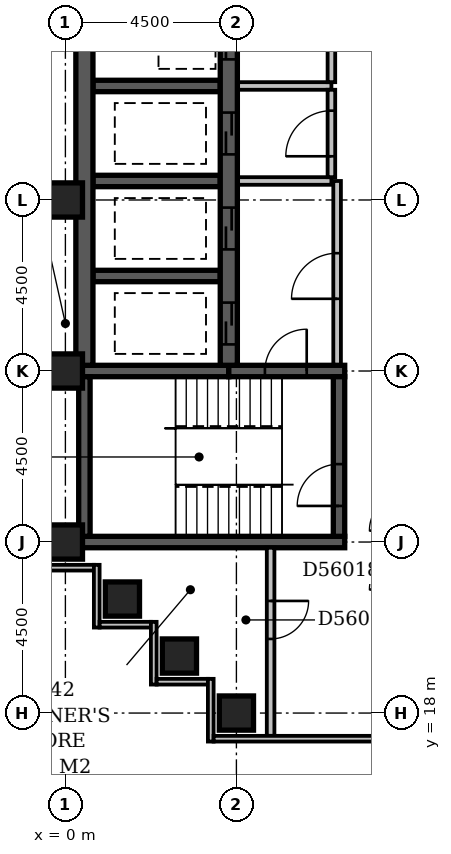
"""IFC4 building model, lengths in metres.
Left out: names, types, materials, properties, quantities, classifications, styles, units other than length and angle.
Written with IfcOpenShell. Run it as: python <this file> out.ifc"""

import sys

from ifc_helpers import new_model, si_unit, direction, frame, frame_2d, origin, origin_2d, place, context, subcontext, project, spatial, rectangle, extrude, element, fill, save


model = new_model("IFC4")
c1 = context("Model", 3, precision=1e-05, world=origin(), true_north=direction((0.0, 1.0)))
c2 = subcontext(c1, "Body", "Model", "MODEL_VIEW")
j1 = project(units=[si_unit("LENGTHUNIT", "METRE"), si_unit("PLANEANGLEUNIT", "RADIAN")], contexts=[c1])
p1 = place(None, origin())
s1 = spatial("IfcSite", under=j1, at=p1, CompositionType="ELEMENT")
p2 = place(p1, origin())
s2 = spatial("IfcBuilding", under=s1, at=p2, CompositionType="ELEMENT")
p3 = place(p2, frame((0.0, 0.0, 218.6)))
s3 = spatial("IfcBuildingStorey", under=s2, at=p3, CompositionType="ELEMENT", Elevation=218.6)
p4 = place(p3, frame((0.35, 22.5, -0.3), z_axis=(0.0, 0.0, 1.0), x_axis=(1.0, 0.0, 0.0)))
e1 = element("IfcWall", 1, at=p4, inside=s3, PredefinedType="SHEAR", context=c2, shape_type="SweptSolid", body=[
    extrude(rectangle(XDim=7.0, YDim=0.3, at=frame_2d((3.5, 0.0))), origin(), (0.0, 0.0, 1.0), 3.6),
])
p5 = place(p3, frame((0.35, 27.0, -0.3), z_axis=(0.0, 0.0, 1.0), x_axis=(1.0, 0.0, 0.0)))
e2 = element("IfcWall", 2, at=p5, inside=s3, PredefinedType="SHEAR", context=c2, shape_type="SweptSolid", body=[
    extrude(rectangle(XDim=3.95, YDim=0.3, at=frame_2d((1.975, 0.0))), origin(), (0.0, 0.0, 1.0), 3.6),
])
p6 = place(p3, frame((0.5, 22.65, -0.3), z_axis=(0.0, 0.0, 1.0), x_axis=(0.0, 1.0, 0.0)))
e3 = element("IfcWall", 3, at=p6, inside=s3, PredefinedType="SHEAR", context=c2, shape_type="SweptSolid", body=[
    extrude(rectangle(XDim=4.2, YDim=0.3, at=frame_2d((2.1, 0.0))), origin(), (0.0, 0.0, 1.0), 3.6),
])
p7 = place(p3, frame((0.5, 27.15, -0.3), z_axis=(0.0, 0.0, 1.0), x_axis=(0.0, 1.0, 0.0)))
e4 = element("IfcWall", 4, at=p7, inside=s3, PredefinedType="SHEAR", context=c2, shape_type="SweptSolid", body=[
    extrude(rectangle(XDim=22.125, YDim=0.45, at=frame_2d((11.062, 0.0))), origin(), (0.0, 0.0, 1.0), 3.6),
])
for number, where, z_axis, x_axis in (
    (5, (0.725, 29.5, -0.3), (0.0, 0.0, 1.0), (1.0, 0.0, 0.0)),
    (6, (0.725, 32.0, -0.3), (0.0, 0.0, 1.0), (1.0, 0.0, 0.0)),
    (7, (0.725, 34.5, -0.3), (0.0, 0.0, 1.0), (1.0, 0.0, 0.0)),
):
    element("IfcWall", number, at=place(p3, frame(where, z_axis=z_axis, x_axis=x_axis)), inside=s3, PredefinedType="SHEAR", context=c2, shape_type="SweptSolid", body=[
        extrude(rectangle(XDim=3.35, YDim=0.3, at=frame_2d((1.675, 0.0))), origin(), (0.0, 0.0, 1.0), 3.6),
    ])
p8 = place(p3, frame((4.3, 27.0, -0.3), z_axis=(0.0, 0.0, 1.0), x_axis=(1.0, 0.0, 0.0)))
e8 = element("IfcWall", 8, at=p8, inside=s3, PredefinedType="SHEAR", context=c2, shape_type="SweptSolid", body=[
    extrude(rectangle(XDim=3.05, YDim=0.3, at=frame_2d((1.525, 0.0))), origin(), (0.0, 0.0, 1.0), 3.6),
])
p9 = place(p8, frame((0.95, 0.0, 0.3)))
e9 = element("IfcOpeningElement", 9, at=p9, cuts=e8, PredefinedType="OPENING", context=c2, shape_type="SweptSolid", body=[
    extrude(rectangle(XDim=1.1, YDim=2.1, at=frame_2d((0.55, 1.05))), frame((0.0, 0.162, 0.0), z_axis=(0.0, -1.0, 0.0), x_axis=(1.0, 0.0, 0.0)), (0.0, 0.0, 1.0), 0.324),
])
p10 = place(p3, frame((4.3, 27.15, -0.3), z_axis=(0.0, 0.0, 1.0), x_axis=(0.0, 1.0, 0.0)))
e10 = element("IfcWall", 10, at=p10, inside=s3, PredefinedType="SHEAR", context=c2, shape_type="SweptSolid", body=[
    extrude(rectangle(XDim=22.125, YDim=0.45, at=frame_2d((11.062, 0.0))), origin(), (0.0, 0.0, 1.0), 3.6),
])
p11 = place(p10, frame((3.05, 0.0, 0.3)))
e11 = element("IfcOpeningElement", 11, at=p11, cuts=e10, PredefinedType="OPENING", context=c2, shape_type="SweptSolid", body=[
    extrude(rectangle(XDim=1.1, YDim=2.1, at=frame_2d((0.55, 1.05))), frame((0.0, 0.237, 0.0), z_axis=(0.0, -1.0, 0.0), x_axis=(1.0, 0.0, 0.0)), (0.0, 0.0, 1.0), 0.474),
])
p12 = place(p10, frame((0.55, 0.0, 0.3)))
e12 = element("IfcOpeningElement", 12, at=p12, cuts=e10, PredefinedType="OPENING", context=c2, shape_type="SweptSolid", body=[
    extrude(rectangle(XDim=1.1, YDim=2.1, at=frame_2d((0.55, 1.05))), frame((0.0, 0.237, 0.0), z_axis=(0.0, -1.0, 0.0), x_axis=(1.0, 0.0, 0.0)), (0.0, 0.0, 1.0), 0.474),
])
p13 = place(p10, frame((20.55, 0.0, 0.3)))
e13 = element("IfcOpeningElement", 13, at=p13, cuts=e10, PredefinedType="OPENING", context=c2, shape_type="SweptSolid", body=[
    extrude(rectangle(XDim=1.1, YDim=2.1, at=frame_2d((0.55, 1.05))), frame((0.0, 0.237, 0.0), z_axis=(0.0, -1.0, 0.0), x_axis=(1.0, 0.0, 0.0)), (0.0, 0.0, 1.0), 0.474),
])
p14 = place(p10, frame((18.05, 0.0, 0.3)))
e14 = element("IfcOpeningElement", 14, at=p14, cuts=e10, PredefinedType="OPENING", context=c2, shape_type="SweptSolid", body=[
    extrude(rectangle(XDim=1.1, YDim=2.1, at=frame_2d((0.55, 1.05))), frame((0.0, 0.237, 0.0), z_axis=(0.0, -1.0, 0.0), x_axis=(1.0, 0.0, 0.0)), (0.0, 0.0, 1.0), 0.474),
])
p15 = place(p10, frame((15.55, 0.0, 0.3)))
e15 = element("IfcOpeningElement", 15, at=p15, cuts=e10, PredefinedType="OPENING", context=c2, shape_type="SweptSolid", body=[
    extrude(rectangle(XDim=1.1, YDim=2.1, at=frame_2d((0.55, 1.05))), frame((0.0, 0.237, 0.0), z_axis=(0.0, -1.0, 0.0), x_axis=(1.0, 0.0, 0.0)), (0.0, 0.0, 1.0), 0.474),
])
p16 = place(p10, frame((13.05, 0.0, 0.3)))
e16 = element("IfcOpeningElement", 16, at=p16, cuts=e10, PredefinedType="OPENING", context=c2, shape_type="SweptSolid", body=[
    extrude(rectangle(XDim=1.1, YDim=2.1, at=frame_2d((0.55, 1.05))), frame((0.0, 0.237, 0.0), z_axis=(0.0, -1.0, 0.0), x_axis=(1.0, 0.0, 0.0)), (0.0, 0.0, 1.0), 0.474),
])
p17 = place(p10, frame((10.55, 0.0, 0.3)))
e17 = element("IfcOpeningElement", 17, at=p17, cuts=e10, PredefinedType="OPENING", context=c2, shape_type="SweptSolid", body=[
    extrude(rectangle(XDim=1.1, YDim=2.1, at=frame_2d((0.55, 1.05))), frame((0.0, 0.237, 0.0), z_axis=(0.0, -1.0, 0.0), x_axis=(1.0, 0.0, 0.0)), (0.0, 0.0, 1.0), 0.474),
])
p18 = place(p10, frame((8.05, 0.0, 0.3)))
e18 = element("IfcOpeningElement", 18, at=p18, cuts=e10, PredefinedType="OPENING", context=c2, shape_type="SweptSolid", body=[
    extrude(rectangle(XDim=1.1, YDim=2.1, at=frame_2d((0.55, 1.05))), frame((0.0, 0.237, 0.0), z_axis=(0.0, -1.0, 0.0), x_axis=(1.0, 0.0, 0.0)), (0.0, 0.0, 1.0), 0.474),
])
p19 = place(p10, frame((5.55, 0.0, 0.3)))
e19 = element("IfcOpeningElement", 19, at=p19, cuts=e10, PredefinedType="OPENING", context=c2, shape_type="SweptSolid", body=[
    extrude(rectangle(XDim=1.1, YDim=2.1, at=frame_2d((0.55, 1.05))), frame((0.0, 0.237, 0.0), z_axis=(0.0, -1.0, 0.0), x_axis=(1.0, 0.0, 0.0)), (0.0, 0.0, 1.0), 0.474),
])
p20 = place(p3, frame((7.2, 22.65, -0.3), z_axis=(0.0, 0.0, 1.0), x_axis=(0.0, 1.0, 0.0)))
e20 = element("IfcWall", 20, at=p20, inside=s3, PredefinedType="SHEAR", context=c2, shape_type="SweptSolid", body=[
    extrude(rectangle(XDim=4.2, YDim=0.3, at=frame_2d((2.1, 0.0))), origin(), (0.0, 0.0, 1.0), 3.6),
])
p21 = place(p20, frame((0.8, 0.0, 0.3)))
e21 = element("IfcOpeningElement", 21, at=p21, cuts=e20, PredefinedType="OPENING", context=c2, shape_type="SweptSolid", body=[
    extrude(rectangle(XDim=1.1, YDim=2.1, at=frame_2d((0.55, 1.05))), frame((0.0, 0.162, 0.0), z_axis=(0.0, -1.0, 0.0), x_axis=(1.0, 0.0, 0.0)), (0.0, 0.0, 1.0), 0.324),
])
for number, where, z_axis, x_axis in (
    (22, (4.5, 18.0, -0.3), (0.0, 0.0, 1.0), (1.0, 0.0, 0.0)),
    (23, (3.0, 19.5, -0.3), (0.0, 0.0, 1.0), (1.0, 0.0, 0.0)),
    (24, (1.5, 21.0, -0.3), (0.0, 0.0, 1.0), (1.0, 0.0, 0.0)),
    (25, (0.0, 22.5, -0.3), (0.0, 0.0, 1.0), (1.0, 0.0, 0.0)),
    (26, (0.0, 27.0, -0.3), (0.0, 0.0, 1.0), (1.0, 0.0, 0.0)),
    (27, (0.0, 31.5, -0.3), (0.0, 0.0, 1.0), (1.0, 0.0, 0.0)),
):
    element("IfcColumn", number, at=place(p3, frame(where, z_axis=z_axis, x_axis=x_axis)), inside=s3, PredefinedType="COLUMN", context=c2, shape_type="SweptSolid", body=[
        extrude(rectangle(XDim=0.9, YDim=0.9, at=origin_2d()), origin(), (0.0, 0.0, 1.0), 3.6),
    ])
p22 = place(p3, frame((-0.6, 21.825, 0.0), z_axis=(0.0, 0.0, 1.0), x_axis=(1.0, 0.0, 0.0)))
e28 = element("IfcWall", 28, at=p22, inside=s3, PredefinedType="STANDARD", context=c2, shape_type="SweptSolid", body=[
    extrude(rectangle(XDim=1.35, YDim=0.15, at=frame_2d((0.675, 0.0))), origin(), (0.0, 0.0, 1.0), 2.7),
])
p23 = place(p3, frame((0.825, 21.9, 0.0), z_axis=(0.0, 0.0, 1.0), x_axis=(0.0, -1.0, 0.0)))
e29 = element("IfcWall", 29, at=p23, inside=s3, PredefinedType="STANDARD", context=c2, shape_type="SweptSolid", body=[
    extrude(rectangle(XDim=1.65, YDim=0.15, at=frame_2d((0.825, 0.0))), origin(), (0.0, 0.0, 1.0), 2.7),
])
p24 = place(p3, frame((0.9, 20.325, 0.0), z_axis=(0.0, 0.0, 1.0), x_axis=(1.0, 0.0, 0.0)))
e30 = element("IfcWall", 30, at=p24, inside=s3, PredefinedType="STANDARD", context=c2, shape_type="SweptSolid", body=[
    extrude(rectangle(XDim=1.35, YDim=0.15, at=frame_2d((0.675, 0.0))), origin(), (0.0, 0.0, 1.0), 2.7),
])
p25 = place(p3, frame((2.325, 20.4, 0.0), z_axis=(0.0, 0.0, 1.0), x_axis=(0.0, -1.0, 0.0)))
e31 = element("IfcWall", 31, at=p25, inside=s3, PredefinedType="STANDARD", context=c2, shape_type="SweptSolid", body=[
    extrude(rectangle(XDim=1.65, YDim=0.15, at=frame_2d((0.825, 0.0))), origin(), (0.0, 0.0, 1.0), 2.7),
])
p26 = place(p3, frame((2.4, 18.825, 0.0), z_axis=(0.0, 0.0, 1.0), x_axis=(1.0, 0.0, 0.0)))
e32 = element("IfcWall", 32, at=p26, inside=s3, PredefinedType="STANDARD", context=c2, shape_type="SweptSolid", body=[
    extrude(rectangle(XDim=1.35, YDim=0.15, at=frame_2d((0.675, 0.0))), origin(), (0.0, 0.0, 1.0), 2.7),
])
p27 = place(p3, frame((3.825, 18.9, 0.0), z_axis=(0.0, 0.0, 1.0), x_axis=(0.0, -1.0, 0.0)))
e33 = element("IfcWall", 33, at=p27, inside=s3, PredefinedType="STANDARD", context=c2, shape_type="SweptSolid", body=[
    extrude(rectangle(XDim=1.65, YDim=0.15, at=frame_2d((0.825, 0.0))), origin(), (0.0, 0.0, 1.0), 2.7),
])
p28 = place(p3, frame((3.9, 17.325, 0.0), z_axis=(0.0, 0.0, 1.0), x_axis=(1.0, 0.0, 0.0)))
e34 = element("IfcWall", 34, at=p28, inside=s3, PredefinedType="STANDARD", context=c2, shape_type="SweptSolid", body=[
    extrude(rectangle(XDim=19.35, YDim=0.15, at=frame_2d((9.675, 0.0))), origin(), (0.0, 0.0, 1.0), 2.7),
])
p29 = place(p28, frame((15.15, 0.0, 0.6)))
e35 = element("IfcOpeningElement", 35, at=p29, cuts=e34, PredefinedType="OPENING", context=c2, shape_type="SweptSolid", body=[
    extrude(rectangle(XDim=2.4, YDim=1.8, at=frame_2d((1.2, 0.9))), frame((0.0, 0.087, 0.0), z_axis=(0.0, -1.0, 0.0), x_axis=(1.0, 0.0, 0.0)), (0.0, 0.0, 1.0), 0.174),
])
p30 = place(p3, frame((4.545, 34.5, 0.0), z_axis=(0.0, 0.0, 1.0), x_axis=(1.0, 0.0, 0.0)))
e36 = element("IfcWall", 36, at=p30, inside=s3, PredefinedType="PARTITIONING", context=c2, shape_type="SweptSolid", body=[
    extrude(rectangle(XDim=2.455, YDim=0.2, at=frame_2d((1.228, 0.0))), origin(), (0.0, 0.0, 1.0), 3.3),
])
p31 = place(p3, frame((7.0, 34.6, 0.0), z_axis=(0.0, 0.0, 1.0), x_axis=(0.0, 1.0, 0.0)))
e37 = element("IfcWall", 37, at=p31, inside=s3, PredefinedType="PARTITIONING", context=c2, shape_type="SweptSolid", body=[
    extrude(rectangle(XDim=14.9, YDim=0.2, at=frame_2d((7.45, 0.0))), origin(), (0.0, 0.0, 1.0), 3.3),
])
p32 = place(p31, frame((2.8, 0.0, 0.0)))
e38 = element("IfcOpeningElement", 38, at=p32, cuts=e37, PredefinedType="OPENING", context=c2, shape_type="SweptSolid", body=[
    extrude(rectangle(XDim=1.2, YDim=2.1, at=frame_2d((0.6, 1.05))), frame((0.0, 0.112, 0.0), z_axis=(0.0, -1.0, 0.0), x_axis=(1.0, 0.0, 0.0)), (0.0, 0.0, 1.0), 0.224),
])
p33 = place(p31, frame((9.8, 0.0, 0.0)))
e39 = element("IfcOpeningElement", 39, at=p33, cuts=e37, PredefinedType="OPENING", context=c2, shape_type="SweptSolid", body=[
    extrude(rectangle(XDim=1.2, YDim=2.1, at=frame_2d((0.6, 1.05))), frame((0.0, 0.112, 0.0), z_axis=(0.0, -1.0, 0.0), x_axis=(1.0, 0.0, 0.0)), (0.0, 0.0, 1.0), 0.224),
])
p34 = place(p3, frame((4.545, 32.0, 0.0), z_axis=(0.0, 0.0, 1.0), x_axis=(1.0, 0.0, 0.0)))
e40 = element("IfcWall", 40, at=p34, inside=s3, PredefinedType="PARTITIONING", context=c2, shape_type="SweptSolid", body=[
    extrude(rectangle(XDim=2.455, YDim=0.2, at=frame_2d((1.228, 0.0))), origin(), (0.0, 0.0, 1.0), 3.3),
])
p35 = place(p3, frame((7.0, 32.1, 0.0), z_axis=(0.0, 0.0, 1.0), x_axis=(0.0, 1.0, 0.0)))
e41 = element("IfcWall", 41, at=p35, inside=s3, PredefinedType="PARTITIONING", context=c2, shape_type="SweptSolid", body=[
    extrude(rectangle(XDim=2.3, YDim=0.2, at=frame_2d((1.15, 0.0))), origin(), (0.0, 0.0, 1.0), 3.3),
])
p36 = place(p35, frame((0.55, 0.0, 0.0)))
e42 = element("IfcOpeningElement", 42, at=p36, cuts=e41, PredefinedType="OPENING", context=c2, shape_type="SweptSolid", body=[
    extrude(rectangle(XDim=1.2, YDim=2.1, at=frame_2d((0.6, 1.05))), frame((0.0, 0.112, 0.0), z_axis=(0.0, -1.0, 0.0), x_axis=(1.0, 0.0, 0.0)), (0.0, 0.0, 1.0), 0.224),
])
p37 = place(p3, frame((7.15, 27.17, 0.0), z_axis=(0.0, 0.0, 1.0), x_axis=(0.0, 1.0, 0.0)))
e43 = element("IfcWall", 43, at=p37, inside=s3, PredefinedType="PARTITIONING", context=c2, shape_type="SweptSolid", body=[
    extrude(rectangle(XDim=4.83, YDim=0.2, at=frame_2d((2.415, 0.0))), origin(), (0.0, 0.0, 1.0), 3.3),
])
p38 = place(p37, frame((1.73, 0.0, 0.0)))
e44 = element("IfcOpeningElement", 44, at=p38, cuts=e43, PredefinedType="OPENING", context=c2, shape_type="SweptSolid", body=[
    extrude(rectangle(XDim=1.2, YDim=2.1, at=frame_2d((0.6, 1.05))), frame((0.0, 0.112, 0.0), z_axis=(0.0, -1.0, 0.0), x_axis=(1.0, 0.0, 0.0)), (0.0, 0.0, 1.0), 0.224),
])
p39 = place(p3, frame((5.4, 17.4, 0.0), z_axis=(0.0, 0.0, 1.0), x_axis=(0.0, 1.0, 0.0)))
e45 = element("IfcWall", 45, at=p39, inside=s3, PredefinedType="PARTITIONING", context=c2, shape_type="SweptSolid", body=[
    extrude(rectangle(XDim=4.95, YDim=0.2, at=frame_2d((2.475, 0.0))), origin(), (0.0, 0.0, 1.0), 3.3),
])
p40 = place(p39, frame((2.55, 0.0, 0.0)))
e46 = element("IfcOpeningElement", 46, at=p40, cuts=e45, PredefinedType="OPENING", context=c2, shape_type="SweptSolid", body=[
    extrude(rectangle(XDim=1.0, YDim=2.1, at=frame_2d((0.5, 1.05))), frame((0.0, 0.112, 0.0), z_axis=(0.0, -1.0, 0.0), x_axis=(1.0, 0.0, 0.0)), (0.0, 0.0, 1.0), 0.224),
])
p41 = place(p38, origin())
e47 = element("IfcDoor", 47, at=p41, inside=s3, OperationType="SINGLE_SWING_LEFT", PredefinedType="DOOR", context=c2, shape_type="SweptSolid", body=[
    extrude(rectangle(XDim=1.2, YDim=2.1, at=frame_2d((0.6, 1.05))), frame((0.0, 0.025, 0.0), z_axis=(0.0, -1.0, 0.0), x_axis=(1.0, 0.0, 0.0)), (0.0, 0.0, 1.0), 0.05),
])
fill(e44, e47)
p42 = place(p11, origin())
e48 = element("IfcDoor", 48, at=p42, inside=s3, OperationType="SLIDING_TO_LEFT", PredefinedType="DOOR", context=c2, shape_type="SweptSolid", body=[
    extrude(rectangle(XDim=1.1, YDim=2.1, at=frame_2d((0.55, 1.05))), frame((0.0, 0.025, 0.0), z_axis=(0.0, -1.0, 0.0), x_axis=(1.0, 0.0, 0.0)), (0.0, 0.0, 1.0), 0.05),
])
fill(e11, e48)
p43 = place(p12, origin())
e49 = element("IfcDoor", 49, at=p43, inside=s3, OperationType="SLIDING_TO_LEFT", PredefinedType="DOOR", context=c2, shape_type="SweptSolid", body=[
    extrude(rectangle(XDim=1.1, YDim=2.1, at=frame_2d((0.55, 1.05))), frame((0.0, 0.025, 0.0), z_axis=(0.0, -1.0, 0.0), x_axis=(1.0, 0.0, 0.0)), (0.0, 0.0, 1.0), 0.05),
])
fill(e12, e49)
p44 = place(p18, origin())
e50 = element("IfcDoor", 50, at=p44, inside=s3, OperationType="SLIDING_TO_LEFT", PredefinedType="DOOR", context=c2, shape_type="SweptSolid", body=[
    extrude(rectangle(XDim=1.1, YDim=2.1, at=frame_2d((0.55, 1.05))), frame((0.0, 0.025, 0.0), z_axis=(0.0, -1.0, 0.0), x_axis=(1.0, 0.0, 0.0)), (0.0, 0.0, 1.0), 0.05),
])
fill(e18, e50)
p45 = place(p36, origin())
e51 = element("IfcDoor", 51, at=p45, inside=s3, OperationType="SINGLE_SWING_LEFT", PredefinedType="DOOR", context=c2, shape_type="SweptSolid", body=[
    extrude(rectangle(XDim=1.2, YDim=2.1, at=frame_2d((0.6, 1.05))), frame((0.0, 0.025, 0.0), z_axis=(0.0, -1.0, 0.0), x_axis=(1.0, 0.0, 0.0)), (0.0, 0.0, 1.0), 0.05),
])
fill(e42, e51)
p46 = place(p19, origin())
e52 = element("IfcDoor", 52, at=p46, inside=s3, OperationType="SLIDING_TO_LEFT", PredefinedType="DOOR", context=c2, shape_type="SweptSolid", body=[
    extrude(rectangle(XDim=1.1, YDim=2.1, at=frame_2d((0.55, 1.05))), frame((0.0, 0.025, 0.0), z_axis=(0.0, -1.0, 0.0), x_axis=(1.0, 0.0, 0.0)), (0.0, 0.0, 1.0), 0.05),
])
fill(e19, e52)
p47 = place(p9, frame((1.1, 0.0, 0.0), z_axis=(0.0, 0.0, 1.0), x_axis=(-1.0, 0.0, 0.0)))
e53 = element("IfcDoor", 53, at=p47, inside=s3, OperationType="SINGLE_SWING_LEFT", PredefinedType="DOOR", context=c2, shape_type="SweptSolid", body=[
    extrude(rectangle(XDim=1.1, YDim=2.1, at=frame_2d((0.55, 1.05))), frame((0.0, 0.025, 0.0), z_axis=(0.0, -1.0, 0.0), x_axis=(1.0, 0.0, 0.0)), (0.0, 0.0, 1.0), 0.05),
])
fill(e9, e53)
p48 = place(p21, origin())
e54 = element("IfcDoor", 54, at=p48, inside=s3, OperationType="SINGLE_SWING_LEFT", PredefinedType="DOOR", context=c2, shape_type="SweptSolid", body=[
    extrude(rectangle(XDim=1.1, YDim=2.1, at=frame_2d((0.55, 1.05))), frame((0.0, 0.025, 0.0), z_axis=(0.0, -1.0, 0.0), x_axis=(1.0, 0.0, 0.0)), (0.0, 0.0, 1.0), 0.05),
])
fill(e21, e54)
p49 = place(p40, origin())
e55 = element("IfcDoor", 55, at=p49, inside=s3, OperationType="SINGLE_SWING_RIGHT", PredefinedType="DOOR", context=c2, shape_type="SweptSolid", body=[
    extrude(rectangle(XDim=1.0, YDim=2.1, at=frame_2d((0.5, 1.05))), frame((0.0, 0.025, 0.0), z_axis=(0.0, -1.0, 0.0), x_axis=(1.0, 0.0, 0.0)), (0.0, 0.0, 1.0), 0.05),
])
fill(e46, e55)
save(model, sys.argv[1])
